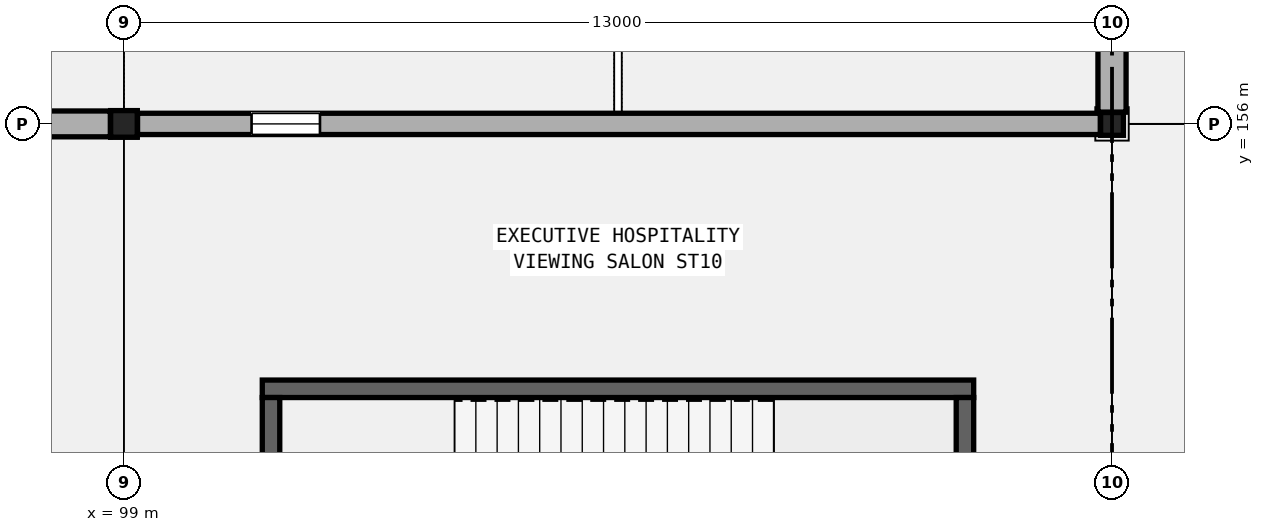
"""IFC4 building model, lengths in metres.
Left out: names, types, materials, properties, quantities, classifications, styles, units other than length and angle.
Written with IfcOpenShell. Run it as: python <this file> out.ifc"""

import sys

from ifc_helpers import new_model, si_unit, direction, frame, frame_2d, origin, origin_2d, place, context, subcontext, project, spatial, rectangle, hollow_rectangle, extrude, element, fill, save


model = new_model("IFC4")
c1 = context("Model", 3, precision=1e-05, world=origin(), true_north=direction((0.0, 1.0)))
c2 = subcontext(c1, "Body", "Model", "MODEL_VIEW")
j1 = project(units=[si_unit("LENGTHUNIT", "METRE"), si_unit("PLANEANGLEUNIT", "RADIAN")], contexts=[c1])
p1 = place(None, origin())
s1 = spatial("IfcSite", under=j1, at=p1, CompositionType="ELEMENT")
p2 = place(p1, origin())
s2 = spatial("IfcBuilding", under=s1, at=p2, CompositionType="ELEMENT")
p3 = place(p2, frame((0.0, 0.0, 20.4)))
s3 = spatial("IfcBuildingStorey", under=s2, at=p3, CompositionType="ELEMENT", Elevation=20.4)
p4 = place(p3, frame((99.0, 156.0, 0.0), z_axis=(0.0, 0.0, 1.0), x_axis=(1.0, 0.0, 0.0)))
e1 = element("IfcColumn", 1, at=p4, inside=s3, PredefinedType="COLUMN", context=c2, shape_type="SweptSolid", body=[
    extrude(hollow_rectangle(XDim=0.35, YDim=0.35, WallThickness=0.016, InnerFilletRadius=0.016, OuterFilletRadius=0.032, at=origin_2d()), origin(), (0.0, 0.0, 1.0), 5.4),
])
p5 = place(p3, frame((112.0, 156.0, 0.0), z_axis=(0.0, 0.0, 1.0), x_axis=(1.0, 0.0, 0.0)))
e2 = element("IfcColumn", 2, at=p5, inside=s3, PredefinedType="COLUMN", context=c2, shape_type="SweptSolid", body=[
    extrude(hollow_rectangle(XDim=0.3, YDim=0.3, WallThickness=0.012, InnerFilletRadius=0.012, OuterFilletRadius=0.024, at=origin_2d()), origin(), (0.0, 0.0, 1.0), 5.4),
])
p6 = place(p3, frame((86.704, 156.0, 0.0), z_axis=(0.0, 0.0, 1.0), x_axis=(1.0, 0.0, 0.0)))
e3 = element("IfcWall", 3, at=p6, inside=s3, PredefinedType="SOLIDWALL", context=c2, shape_type="SweptSolid", body=[
    extrude(rectangle(XDim=12.117, YDim=0.34, at=frame_2d((6.059, 0.0))), origin(), (0.0, 0.0, 1.0), 4.592),
])
p7 = place(p6, frame((1.5, 0.0, 0.95)))
e4 = element("IfcOpeningElement", 4, at=p7, cuts=e3, PredefinedType="OPENING", context=c2, shape_type="SweptSolid", body=[
    extrude(rectangle(XDim=0.9, YDim=2.1, at=frame_2d((0.45, 1.05))), frame((0.0, 0.18, 0.0), z_axis=(0.0, -1.0, 0.0), x_axis=(1.0, 0.0, 0.0)), (0.0, 0.0, 1.0), 0.36),
])
p8 = place(p3, frame((99.179, 156.0, 0.0), z_axis=(0.0, 0.0, 1.0), x_axis=(1.0, 0.0, 0.0)))
e5 = element("IfcWall", 5, at=p8, inside=s3, PredefinedType="SOLIDWALL", context=c2, shape_type="SweptSolid", body=[
    extrude(rectangle(XDim=12.667, YDim=0.28, at=frame_2d((6.333, 0.0))), origin(), (0.0, 0.0, 1.0), 4.48),
])
p9 = place(p8, frame((1.5, 0.0, 0.95)))
e6 = element("IfcOpeningElement", 6, at=p9, cuts=e5, PredefinedType="OPENING", context=c2, shape_type="SweptSolid", body=[
    extrude(rectangle(XDim=0.9, YDim=2.7, at=frame_2d((0.45, 1.35))), frame((0.0, 0.15, 0.0), z_axis=(0.0, -1.0, 0.0), x_axis=(1.0, 0.0, 0.0)), (0.0, 0.0, 1.0), 0.3),
])
p10 = place(p3, frame((112.0, 156.154, 0.0), z_axis=(0.0, 0.0, 1.0), x_axis=(0.0, 1.0, 0.0)))
e7 = element("IfcWall", 7, at=p10, inside=s3, PredefinedType="SOLIDWALL", context=c2, shape_type="SweptSolid", body=[
    extrude(rectangle(XDim=11.717, YDim=0.37, at=frame_2d((5.858, 0.0))), origin(), (0.0, 0.0, 1.0), 4.58),
])
p11 = place(p10, frame((2.416, 0.0, 0.95)))
e8 = element("IfcOpeningElement", 8, at=p11, cuts=e7, PredefinedType="OPENING", context=c2, shape_type="SweptSolid", body=[
    extrude(rectangle(XDim=1.2, YDim=2.3, at=frame_2d((0.6, 1.15))), frame((0.0, 0.195, 0.0), z_axis=(0.0, -1.0, 0.0), x_axis=(1.0, 0.0, 0.0)), (0.0, 0.0, 1.0), 0.39),
])
p12 = place(p3, frame((100.82, 152.515, 0.0), z_axis=(0.0, 0.0, 1.0), x_axis=(1.0, 0.0, 0.0)))
e9 = element("IfcWall", 9, at=p12, inside=s3, PredefinedType="SHEAR", context=c2, shape_type="SweptSolid", body=[
    extrude(rectangle(XDim=9.36, YDim=0.23, at=frame_2d((4.68, 0.0))), origin(), (0.0, 0.0, 1.0), 5.18),
])
for number, where, z_axis, x_axis in (
    (10, (100.935, 147.6, 0.0), (0.0, 0.0, 1.0), (0.0, 1.0, 0.0)),
    (11, (110.065, 147.6, 0.0), (0.0, 0.0, 1.0), (0.0, 1.0, 0.0)),
):
    element("IfcWall", number, at=place(p3, frame(where, z_axis=z_axis, x_axis=x_axis)), inside=s3, PredefinedType="SHEAR", context=c2, shape_type="SweptSolid", body=[
        extrude(rectangle(XDim=4.8, YDim=0.23, at=frame_2d((2.4, 0.0))), origin(), (0.0, 0.0, 1.0), 5.18),
    ])
p13 = place(p9, origin())
e12 = element("IfcWindow", 12, at=p13, inside=s3, PartitioningType="SINGLE_PANEL", PredefinedType="WINDOW", context=c2, shape_type="SweptSolid", body=[
    extrude(rectangle(XDim=0.9, YDim=2.7, at=frame_2d((0.45, 1.35))), frame((0.0, 0.03, 0.0), z_axis=(0.0, -1.0, 0.0), x_axis=(1.0, 0.0, 0.0)), (0.0, 0.0, 1.0), 0.06),
])
fill(e6, e12)
save(model, sys.argv[1])
